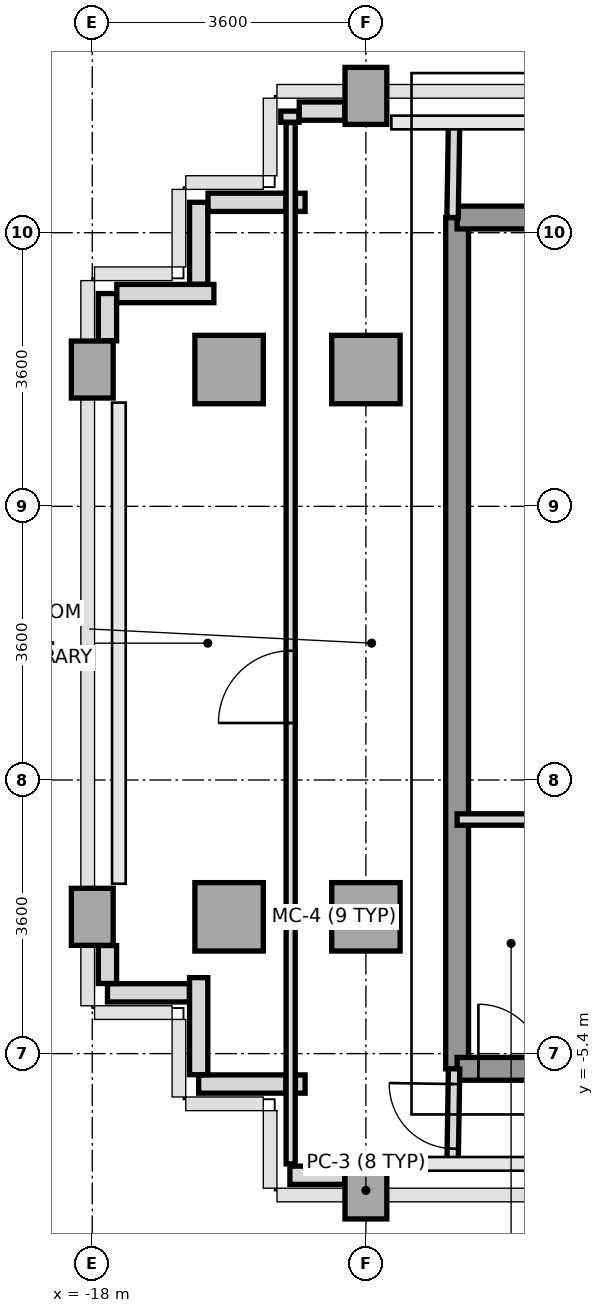
"""IFC4 building model, lengths in metres.
Left out: names, types, materials, properties, quantities, classifications, styles, units other than length and angle.
Written with IfcOpenShell. Run it as: python <this file> out.ifc"""

import sys

from ifc_helpers import new_model, si_unit, direction, frame, frame_2d, origin, origin_2d, place, context, subcontext, project, spatial, rectangle, extrude, source, transform, mapped, element, fill, save


model = new_model("IFC4")
c1 = context("Model", 3, precision=1e-05, world=origin(), true_north=direction((0.0, 1.0)))
c2 = subcontext(c1, "Body", "Model", "MODEL_VIEW")
j1 = project(units=[si_unit("LENGTHUNIT", "METRE"), si_unit("PLANEANGLEUNIT", "RADIAN")], contexts=[c1])
p1 = place(None, origin())
s1 = spatial("IfcSite", under=j1, at=p1, CompositionType="ELEMENT")
p2 = place(p1, origin())
s2 = spatial("IfcBuilding", under=s1, at=p2, CompositionType="ELEMENT")
p3 = place(p2, frame((0.0, 0.0, 230.0)))
s3 = spatial("IfcBuildingStorey", under=s2, at=p3, CompositionType="ELEMENT", Elevation=230.0)
m1 = source(origin(), c2, "Body", "SweptSolid", [
    extrude(rectangle(XDim=0.55, YDim=0.75, at=origin_2d()), origin(), (0.0, 0.0, 1.0), 3.01),
])
for number, where, z_axis, x_axis in (
    (1, (-18.0, -3.6, 0.0), (0.0, 0.0, 1.0), (1.0, 0.0, 0.0)),
    (2, (-18.0, 3.6, 0.0), (0.0, 0.0, 1.0), (1.0, 0.0, 0.0)),
):
    element("IfcColumn", number, at=place(p3, frame(where, z_axis=z_axis, x_axis=x_axis)), inside=s3, PredefinedType="COLUMN", context=c2, shape_type="MappedRepresentation", body=[
        mapped(m1, transform((0.0, 0.0, 0.0), x_axis=(1.0, 0.0, 0.0), y_axis=(0.0, 1.0, 0.0), z_axis=(0.0, 0.0, 1.0), scale=1.0)),
    ])
m2 = source(origin(), c2, "Body", "SweptSolid", [
    extrude(rectangle(XDim=0.9, YDim=0.9, at=origin_2d()), origin(), (0.0, 0.0, 1.0), 3.01),
])
for number, where, z_axis, x_axis in (
    (3, (-16.2, -3.6, 0.0), (0.0, 0.0, 1.0), (1.0, 0.0, 0.0)),
    (4, (-16.2, 3.6, 0.0), (0.0, 0.0, 1.0), (1.0, 0.0, 0.0)),
):
    element("IfcColumn", number, at=place(p3, frame(where, z_axis=z_axis, x_axis=x_axis)), inside=s3, PredefinedType="COLUMN", context=c2, shape_type="MappedRepresentation", body=[
        mapped(m2, transform((0.0, 0.0, 0.0), x_axis=(1.0, 0.0, 0.0), y_axis=(0.0, 1.0, 0.0), z_axis=(0.0, 0.0, 1.0), scale=1.0)),
    ])
p4 = place(p3, frame((-14.4, -7.2, 0.0), z_axis=(0.0, 0.0, 1.0), x_axis=(1.0, 0.0, 0.0)))
e5 = element("IfcColumn", 5, at=p4, inside=s3, PredefinedType="COLUMN", context=c2, shape_type="MappedRepresentation", body=[
    mapped(m1, transform((0.0, 0.0, 0.0), x_axis=(1.0, 0.0, 0.0), y_axis=(0.0, 1.0, 0.0), z_axis=(0.0, 0.0, 1.0), scale=1.0)),
])
for number, where, z_axis, x_axis in (
    (6, (-14.4, -3.6, 0.0), (0.0, 0.0, 1.0), (1.0, 0.0, 0.0)),
    (7, (-14.4, 3.6, 0.0), (0.0, 0.0, 1.0), (1.0, 0.0, 0.0)),
):
    element("IfcColumn", number, at=place(p3, frame(where, z_axis=z_axis, x_axis=x_axis)), inside=s3, PredefinedType="COLUMN", context=c2, shape_type="MappedRepresentation", body=[
        mapped(m2, transform((0.0, 0.0, 0.0), x_axis=(1.0, 0.0, 0.0), y_axis=(0.0, 1.0, 0.0), z_axis=(0.0, 0.0, 1.0), scale=1.0)),
    ])
p5 = place(p3, frame((-14.4, 7.2, 0.0), z_axis=(0.0, 0.0, 1.0), x_axis=(1.0, 0.0, 0.0)))
e8 = element("IfcColumn", 8, at=p5, inside=s3, PredefinedType="COLUMN", context=c2, shape_type="MappedRepresentation", body=[
    mapped(m1, transform((0.0, 0.0, 0.0), x_axis=(1.0, 0.0, 0.0), y_axis=(0.0, 1.0, 0.0), z_axis=(0.0, 0.0, 1.0), scale=1.0)),
])
p6 = place(p3, frame((-14.678, -7.0, 0.0), z_axis=(0.0, 0.0, 1.0), x_axis=(-1.0, 0.0, 0.0)))
e9 = element("IfcWall", 9, at=p6, inside=s3, PredefinedType="PARAPET", context=c2, shape_type="SweptSolid", body=[
    extrude(rectangle(XDim=0.722, YDim=0.24, at=frame_2d((0.361, 0.0))), origin(), (0.0, 0.0, 1.0), 1.15),
])
p7 = place(p3, frame((-15.2, -5.8, 0.0), z_axis=(0.0, 0.0, 1.0), x_axis=(-1.0, 0.0, 0.0)))
e10 = element("IfcWall", 10, at=p7, inside=s3, PredefinedType="PARAPET", context=c2, shape_type="SweptSolid", body=[
    extrude(rectangle(XDim=0.127, YDim=0.24, at=frame_2d((0.063, 0.0))), origin(), (0.0, 0.0, 1.0), 1.15),
])
p8 = place(p3, frame((-15.453, -5.8, 0.0), z_axis=(0.0, 0.0, 1.0), x_axis=(-1.0, 0.0, 0.0)))
e11 = element("IfcWall", 11, at=p8, inside=s3, PredefinedType="PARAPET", context=c2, shape_type="SweptSolid", body=[
    extrude(rectangle(XDim=1.147, YDim=0.24, at=frame_2d((0.574, 0.0))), origin(), (0.0, 0.0, 1.0), 1.15),
])
p9 = place(p3, frame((-16.6, -5.677, 0.0), z_axis=(0.0, 0.0, 1.0), x_axis=(0.0, 1.0, 0.0)))
e12 = element("IfcWall", 12, at=p9, inside=s3, PredefinedType="PARAPET", context=c2, shape_type="SweptSolid", body=[
    extrude(rectangle(XDim=1.277, YDim=0.24, at=frame_2d((0.639, 0.0))), origin(), (0.0, 0.0, 1.0), 1.15),
])
p10 = place(p3, frame((-16.723, -4.6, 0.0), z_axis=(0.0, 0.0, 1.0), x_axis=(-1.0, 0.0, 0.0)))
e13 = element("IfcWall", 13, at=p10, inside=s3, PredefinedType="PARAPET", context=c2, shape_type="SweptSolid", body=[
    extrude(rectangle(XDim=1.077, YDim=0.24, at=frame_2d((0.539, 0.0))), origin(), (0.0, 0.0, 1.0), 1.15),
])
p11 = place(p3, frame((-17.8, -4.477, 0.0), z_axis=(0.0, 0.0, 1.0), x_axis=(0.0, 1.0, 0.0)))
e14 = element("IfcWall", 14, at=p11, inside=s3, PredefinedType="PARAPET", context=c2, shape_type="SweptSolid", body=[
    extrude(rectangle(XDim=0.499, YDim=0.24, at=frame_2d((0.25, 0.0))), origin(), (0.0, 0.0, 1.0), 1.15),
])
p12 = place(p3, frame((-17.8, 3.978, 0.0), z_axis=(0.0, 0.0, 1.0), x_axis=(0.0, 1.0, 0.0)))
e15 = element("IfcWall", 15, at=p12, inside=s3, PredefinedType="PARAPET", context=c2, shape_type="SweptSolid", body=[
    extrude(rectangle(XDim=0.622, YDim=0.24, at=frame_2d((0.311, 0.0))), origin(), (0.0, 0.0, 1.0), 1.15),
])
p13 = place(p3, frame((-17.677, 4.6, 0.0), z_axis=(0.0, 0.0, 1.0), x_axis=(1.0, 0.0, 0.0)))
e16 = element("IfcWall", 16, at=p13, inside=s3, PredefinedType="PARAPET", context=c2, shape_type="SweptSolid", body=[
    extrude(rectangle(XDim=1.277, YDim=0.24, at=frame_2d((0.639, 0.0))), origin(), (0.0, 0.0, 1.0), 1.15),
])
p14 = place(p3, frame((-16.6, 4.723, 0.0), z_axis=(0.0, 0.0, 1.0), x_axis=(0.0, 1.0, 0.0)))
e17 = element("IfcWall", 17, at=p14, inside=s3, PredefinedType="PARAPET", context=c2, shape_type="SweptSolid", body=[
    extrude(rectangle(XDim=1.077, YDim=0.24, at=frame_2d((0.539, 0.0))), origin(), (0.0, 0.0, 1.0), 1.15),
])
p15 = place(p3, frame((-16.477, 5.8, 0.0), z_axis=(0.0, 0.0, 1.0), x_axis=(1.0, 0.0, 0.0)))
e18 = element("IfcWall", 18, at=p15, inside=s3, PredefinedType="PARAPET", context=c2, shape_type="SweptSolid", body=[
    extrude(rectangle(XDim=1.024, YDim=0.24, at=frame_2d((0.512, 0.0))), origin(), (0.0, 0.0, 1.0), 1.15),
])
p16 = place(p3, frame((-15.327, 5.8, 0.0), z_axis=(0.0, 0.0, 1.0), x_axis=(1.0, 0.0, 0.0)))
e19 = element("IfcWall", 19, at=p16, inside=s3, PredefinedType="PARAPET", context=c2, shape_type="SweptSolid", body=[
    extrude(rectangle(XDim=0.127, YDim=0.24, at=frame_2d((0.063, 0.0))), origin(), (0.0, 0.0, 1.0), 1.15),
])
p17 = place(p3, frame((-15.4, 6.853, 0.0), z_axis=(0.0, 0.0, 1.0), x_axis=(0.0, 1.0, 0.0)))
e20 = element("IfcWall", 20, at=p17, inside=s3, PredefinedType="PARAPET", context=c2, shape_type="SweptSolid", body=[
    extrude(rectangle(XDim=0.147, YDim=0.24, at=frame_2d((0.073, 0.0))), origin(), (0.0, 0.0, 1.0), 1.15),
])
p18 = place(p3, frame((-15.277, 7.0, 0.0), z_axis=(0.0, 0.0, 1.0), x_axis=(1.0, 0.0, 0.0)))
e21 = element("IfcWall", 21, at=p18, inside=s3, PredefinedType="PARAPET", context=c2, shape_type="SweptSolid", body=[
    extrude(rectangle(XDim=0.599, YDim=0.24, at=frame_2d((0.3, 0.0))), origin(), (0.0, 0.0, 1.0), 1.15),
])
p19 = place(p3, frame((-13.2, -5.6, 0.0), z_axis=(0.0, 0.0, 1.0), x_axis=(0.0, 1.0, 0.0)))
e22 = element("IfcWall", 22, at=p19, inside=s3, PredefinedType="SHEAR", context=c2, shape_type="SweptSolid", body=[
    extrude(rectangle(XDim=11.2, YDim=0.3, at=frame_2d((5.6, 0.0))), origin(), (0.0, 0.0, 1.0), 3.01),
])
p20 = place(p3, frame((-13.2, 5.6, 0.0), z_axis=(0.0, 0.0, 1.0), x_axis=(1.0, 0.0, 0.0)))
e23 = element("IfcWall", 23, at=p20, inside=s3, PredefinedType="SHEAR", context=c2, shape_type="SweptSolid", body=[
    extrude(rectangle(XDim=1.844, YDim=0.3, at=frame_2d((0.922, 0.0))), origin(), (0.0, 0.0, 1.0), 3.01),
])
p21 = place(p3, frame((-13.2, -5.6, 0.0), z_axis=(0.0, 0.0, 1.0), x_axis=(1.0, 0.0, 0.0)))
e24 = element("IfcWall", 24, at=p21, inside=s3, PredefinedType="SHEAR", context=c2, shape_type="SweptSolid", body=[
    extrude(rectangle(XDim=7.8, YDim=0.3, at=frame_2d((3.9, 0.0))), origin(), (0.0, 0.0, 1.0), 3.01),
])
p22 = place(p21, frame((0.28, 0.0, 0.0)))
e25 = element("IfcOpeningElement", 25, at=p22, cuts=e24, PredefinedType="OPENING", context=c2, shape_type="SweptSolid", body=[
    extrude(rectangle(XDim=0.85, YDim=2.1, at=frame_2d((0.425, 1.05))), frame((0.0, 0.16, 0.0), z_axis=(0.0, -1.0, 0.0), x_axis=(1.0, 0.0, 0.0)), (0.0, 0.0, 1.0), 0.32),
])
p23 = place(p21, frame((1.36, 0.0, 0.0)))
e26 = element("IfcOpeningElement", 26, at=p23, cuts=e24, PredefinedType="OPENING", context=c2, shape_type="SweptSolid", body=[
    extrude(rectangle(XDim=0.85, YDim=2.1, at=frame_2d((0.425, 1.05))), frame((0.0, 0.16, 0.0), z_axis=(0.0, -1.0, 0.0), x_axis=(1.0, 0.0, 0.0)), (0.0, 0.0, 1.0), 0.32),
])
p24 = place(p21, frame((2.85, 0.0, 0.0)))
e27 = element("IfcOpeningElement", 27, at=p24, cuts=e24, PredefinedType="OPENING", context=c2, shape_type="SweptSolid", body=[
    extrude(rectangle(XDim=0.85, YDim=2.1, at=frame_2d((0.425, 1.05))), frame((0.0, 0.16, 0.0), z_axis=(0.0, -1.0, 0.0), x_axis=(1.0, 0.0, 0.0)), (0.0, 0.0, 1.0), 0.32),
])
p25 = place(p21, frame((4.55, 0.0, 0.0)))
e28 = element("IfcOpeningElement", 28, at=p25, cuts=e24, PredefinedType="OPENING", context=c2, shape_type="SweptSolid", body=[
    extrude(rectangle(XDim=0.85, YDim=2.1, at=frame_2d((0.425, 1.05))), frame((0.0, 0.16, 0.0), z_axis=(0.0, -1.0, 0.0), x_axis=(1.0, 0.0, 0.0)), (0.0, 0.0, 1.0), 0.32),
])
p26 = place(p21, frame((6.25, 0.0, 0.0)))
e29 = element("IfcOpeningElement", 29, at=p26, cuts=e24, PredefinedType="OPENING", context=c2, shape_type="SweptSolid", body=[
    extrude(rectangle(XDim=0.85, YDim=2.1, at=frame_2d((0.425, 1.05))), frame((0.0, 0.16, 0.0), z_axis=(0.0, -1.0, 0.0), x_axis=(1.0, 0.0, 0.0)), (0.0, 0.0, 1.0), 0.32),
])
p27 = place(p3, frame((-13.2, -2.32, 0.0), z_axis=(0.0, 0.0, 1.0), x_axis=(1.0, 0.0, 0.0)))
e30 = element("IfcWall", 30, at=p27, inside=s3, PredefinedType="PARTITIONING", context=c2, shape_type="SweptSolid", body=[
    extrude(rectangle(XDim=2.18, YDim=0.15, at=frame_2d((1.09, 0.0))), origin(), (0.0, 0.0, 1.0), 3.01),
])
p28 = place(p3, frame((-13.26, 5.6, 0.0), z_axis=(0.0, 0.0, 1.0), x_axis=(0.016013571389, 0.999871774545, 0.0)))
e31 = element("IfcWall", 31, at=p28, inside=s3, PredefinedType="PARTITIONING", context=c2, shape_type="SweptSolid", body=[
    extrude(rectangle(XDim=1.25, YDim=0.15, at=frame_2d((0.625, 0.0))), origin(), (0.0, 0.0, 1.0), 3.01),
])
p29 = place(p3, frame((-13.26, -6.85, 0.0), z_axis=(0.0, 0.0, 1.0), x_axis=(0.016013571389, 0.999871774545, 0.0)))
e32 = element("IfcWall", 32, at=p29, inside=s3, PredefinedType="PARTITIONING", context=c2, shape_type="SweptSolid", body=[
    extrude(rectangle(XDim=1.25, YDim=0.15, at=frame_2d((0.625, 0.0))), origin(), (0.0, 0.0, 1.0), 3.01),
])
p30 = place(p29, frame((0.2, 0.0, 0.0)))
e33 = element("IfcOpeningElement", 33, at=p30, cuts=e32, PredefinedType="OPENING", context=c2, shape_type="SweptSolid", body=[
    extrude(rectangle(XDim=0.85, YDim=2.1, at=frame_2d((0.425, 1.05))), frame((0.0, 0.085, 0.0), z_axis=(0.0, -1.0, 0.0), x_axis=(1.0, 0.0, 0.0)), (0.0, 0.0, 1.0), 0.17),
])
p31 = place(p3, frame((-15.39, -6.85, 0.0), z_axis=(0.0, 0.0, 1.0), x_axis=(0.0, 1.0, 0.0)))
e34 = element("IfcWall", 34, at=p31, inside=s3, PredefinedType="PARTITIONING", context=c2, shape_type="SweptSolid", body=[
    extrude(rectangle(XDim=13.7, YDim=0.12, at=frame_2d((6.85, 0.0))), origin(), (0.0, 0.0, 1.0), 3.01),
])
p32 = place(p31, frame((5.8, 0.0, 0.0)))
e35 = element("IfcOpeningElement", 35, at=p32, cuts=e34, PredefinedType="OPENING", context=c2, shape_type="SweptSolid", body=[
    extrude(rectangle(XDim=0.95, YDim=2.15, at=frame_2d((0.475, 1.075))), frame((0.0, 0.07, 0.0), z_axis=(0.0, -1.0, 0.0), x_axis=(1.0, 0.0, 0.0)), (0.0, 0.0, 1.0), 0.14),
])
m3 = source(origin(), c2, "Body", "SweptSolid", [
    extrude(rectangle(XDim=0.85, YDim=2.1, at=frame_2d((0.425, 1.05))), frame((0.0, 0.025, 0.0), z_axis=(0.0, -1.0, 0.0), x_axis=(1.0, 0.0, 0.0)), (0.0, 0.0, 1.0), 0.05),
])
p33 = place(p22, origin())
e36 = element("IfcDoor", 36, at=p33, inside=s3, OperationType="SINGLE_SWING_LEFT", PredefinedType="DOOR", context=c2, shape_type="MappedRepresentation", body=[
    mapped(m3, transform((0.0, 0.0, 0.0), x_axis=(1.0, 0.0, 0.0), y_axis=(0.0, 1.0, 0.0), z_axis=(0.0, 0.0, 1.0), scale=1.0)),
])
fill(e25, e36)
p34 = place(p30, origin())
e37 = element("IfcDoor", 37, at=p34, inside=s3, OperationType="SINGLE_SWING_RIGHT", PredefinedType="DOOR", context=c2, shape_type="MappedRepresentation", body=[
    mapped(m3, transform((0.0, 0.0, 0.0), x_axis=(1.0, 0.0, 0.0), y_axis=(0.0, 1.0, 0.0), z_axis=(0.0, 0.0, 1.0), scale=1.0)),
])
fill(e33, e37)
m4 = source(origin(), c2, "Body", "SweptSolid", [
    extrude(rectangle(XDim=0.95, YDim=2.15, at=frame_2d((0.475, 1.075))), frame((0.0, 0.025, 0.0), z_axis=(0.0, -1.0, 0.0), x_axis=(1.0, 0.0, 0.0)), (0.0, 0.0, 1.0), 0.05),
])
p35 = place(p32, origin())
e38 = element("IfcDoor", 38, at=p35, inside=s3, OperationType="SINGLE_SWING_LEFT", PredefinedType="DOOR", context=c2, shape_type="MappedRepresentation", body=[
    mapped(m4, transform((0.0, 0.0, 0.0), x_axis=(1.0, 0.0, 0.0), y_axis=(0.0, 1.0, 0.0), z_axis=(0.0, 0.0, 1.0), scale=1.0)),
])
fill(e35, e38)
save(model, sys.argv[1])
